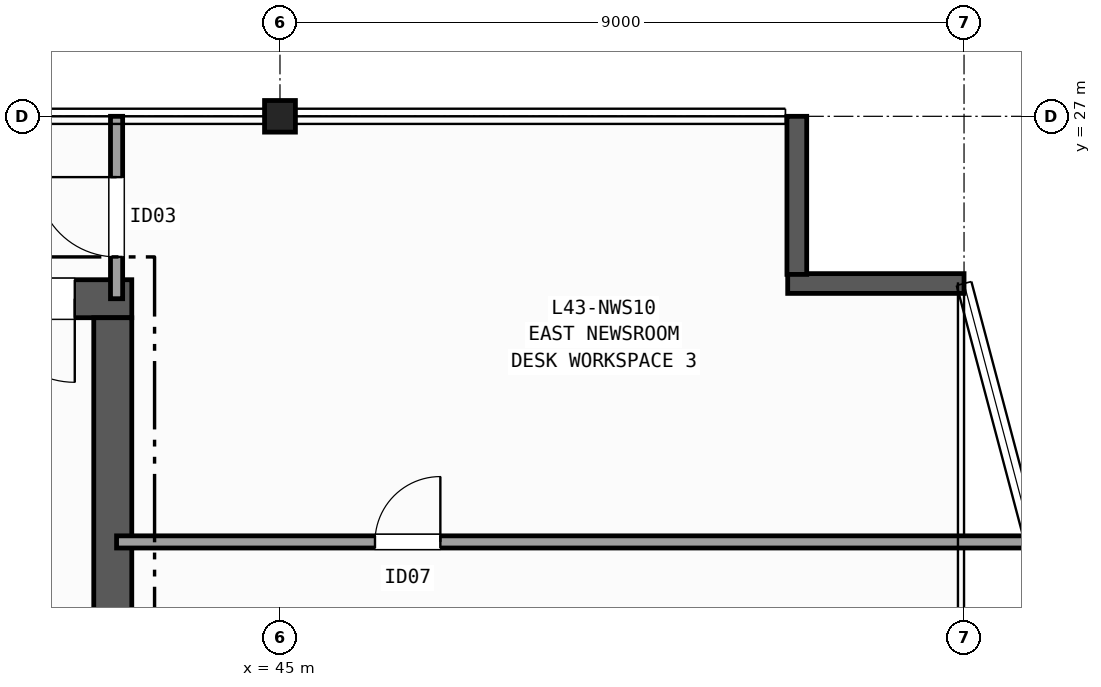
"""IFC4 building model, lengths in metres.
Left out: names, types, materials, properties, quantities, classifications, styles, units other than length and angle.
Written with IfcOpenShell. Run it as: python <this file> out.ifc"""

import sys

from ifc_helpers import new_model, si_unit, direction, frame, frame_2d, origin, origin_2d, place, context, subcontext, project, spatial, rectangle, i_section, extrude, element, fill, save


model = new_model("IFC4")
c1 = context("Model", 3, precision=1e-05, world=origin(), true_north=direction((0.0, 1.0)))
c2 = subcontext(c1, "Body", "Model", "MODEL_VIEW")
j1 = project(units=[si_unit("LENGTHUNIT", "METRE"), si_unit("PLANEANGLEUNIT", "RADIAN")], contexts=[c1])
p1 = place(None, origin())
s1 = spatial("IfcSite", under=j1, at=p1, CompositionType="ELEMENT")
p2 = place(p1, origin())
s2 = spatial("IfcBuilding", under=s1, at=p2, CompositionType="ELEMENT")
p3 = place(p2, frame((0.0, 0.0, 174.2)))
s3 = spatial("IfcBuildingStorey", under=s2, at=p3, CompositionType="ELEMENT", Elevation=174.2)
p4 = place(p3, frame((45.0, 27.0, 0.0), z_axis=(0.0, 0.0, 1.0), x_axis=(1.0, 0.0, 0.0)))
e1 = element("IfcColumn", 1, at=p4, inside=s3, PredefinedType="COLUMN", context=c2, shape_type="SweptSolid", body=[
    extrude(i_section(OverallWidth=0.406, OverallDepth=0.416, WebThickness=0.03, FlangeThickness=0.048, FilletRadius=0.015, at=origin_2d()), origin(), (0.0, 0.0, 1.0), 3.7),
])
p5 = place(p3, frame((54.0, 24.8, 0.0), z_axis=(0.0, 0.0, 1.0), x_axis=(-1.0, 0.0, 0.0)))
e2 = element("IfcWall", 2, at=p5, inside=s3, PredefinedType="SOLIDWALL", context=c2, shape_type="SweptSolid", body=[
    extrude(rectangle(XDim=2.32, YDim=0.26, at=frame_2d((1.16, 0.0))), origin(), (0.0, 0.0, 1.0), 3.42),
])
p6 = place(p3, frame((51.8, 24.92, 0.0), z_axis=(0.0, 0.0, 1.0), x_axis=(0.0, 1.0, 0.0)))
e3 = element("IfcWall", 3, at=p6, inside=s3, PredefinedType="SOLIDWALL", context=c2, shape_type="SweptSolid", body=[
    extrude(rectangle(XDim=2.08, YDim=0.26, at=frame_2d((1.04, 0.0))), origin(), (0.0, 0.0, 1.0), 3.42),
])
p7 = place(p3, frame((43.05, 24.6, 0.0), z_axis=(0.0, 0.0, 1.0), x_axis=(-1.0, 0.0, 0.0)))
e4 = element("IfcWall", 4, at=p7, inside=s3, PredefinedType="SHEAR", context=c2, shape_type="SweptSolid", body=[
    extrude(rectangle(XDim=13.9, YDim=0.5, at=frame_2d((6.95, 0.0))), origin(), (0.0, 0.0, 1.0), 3.42),
])
p8 = place(p7, frame((0.75, 0.0, 0.0)))
e5 = element("IfcOpeningElement", 5, at=p8, cuts=e4, PredefinedType="OPENING", context=c2, shape_type="SweptSolid", body=[
    extrude(rectangle(XDim=1.1, YDim=2.15, at=frame_2d((0.55, 1.075))), frame((0.0, 0.26, 0.0), z_axis=(0.0, -1.0, 0.0), x_axis=(1.0, 0.0, 0.0)), (0.0, 0.0, 1.0), 0.52),
])
p9 = place(p7, frame((2.7, 0.0, 0.0)))
e6 = element("IfcOpeningElement", 6, at=p9, cuts=e4, PredefinedType="OPENING", context=c2, shape_type="SweptSolid", body=[
    extrude(rectangle(XDim=0.9, YDim=2.1, at=frame_2d((0.45, 1.05))), frame((0.0, 0.26, 0.0), z_axis=(0.0, -1.0, 0.0), x_axis=(1.0, 0.0, 0.0)), (0.0, 0.0, 1.0), 0.52),
])
p10 = place(p7, frame((4.6, 0.0, 0.0)))
e7 = element("IfcOpeningElement", 7, at=p10, cuts=e4, PredefinedType="OPENING", context=c2, shape_type="SweptSolid", body=[
    extrude(rectangle(XDim=0.9, YDim=2.1, at=frame_2d((0.45, 1.05))), frame((0.0, 0.26, 0.0), z_axis=(0.0, -1.0, 0.0), x_axis=(1.0, 0.0, 0.0)), (0.0, 0.0, 1.0), 0.52),
])
p11 = place(p3, frame((42.8, 11.45, 0.0), z_axis=(0.0, 0.0, 1.0), x_axis=(0.0, 1.0, 0.0)))
e8 = element("IfcWall", 8, at=p11, inside=s3, PredefinedType="SHEAR", context=c2, shape_type="SweptSolid", body=[
    extrude(rectangle(XDim=12.9, YDim=0.5, at=frame_2d((6.45, 0.0))), origin(), (0.0, 0.0, 1.0), 3.42),
])
p12 = place(p3, frame((42.85, 24.6, 0.0), z_axis=(0.0, 0.0, 1.0), x_axis=(0.0, 1.0, 0.0)))
e9 = element("IfcWall", 9, at=p12, inside=s3, PredefinedType="PARTITIONING", context=c2, shape_type="SweptSolid", body=[
    extrude(rectangle(XDim=2.4, YDim=0.16, at=frame_2d((1.2, 0.0))), origin(), (0.0, 0.0, 1.0), 2.634),
])
p13 = place(p12, frame((0.55, 0.0, 0.0)))
e10 = element("IfcOpeningElement", 10, at=p13, cuts=e9, PredefinedType="OPENING", context=c2, shape_type="SweptSolid", body=[
    extrude(rectangle(XDim=1.05, YDim=2.15, at=frame_2d((0.525, 1.075))), frame((0.0, 0.09, 0.0), z_axis=(0.0, -1.0, 0.0), x_axis=(1.0, 0.0, 0.0)), (0.0, 0.0, 1.0), 0.18),
])
p14 = place(p3, frame((42.85, 21.4, 0.0), z_axis=(0.0, 0.0, 1.0), x_axis=(1.0, 0.0, 0.0)))
e11 = element("IfcWall", 11, at=p14, inside=s3, PredefinedType="PARTITIONING", context=c2, shape_type="SweptSolid", body=[
    extrude(rectangle(XDim=12.05, YDim=0.16, at=frame_2d((6.025, 0.0))), origin(), (0.0, 0.0, 1.0), 3.42),
])
p15 = place(p14, frame((3.4, 0.0, 0.0)))
e12 = element("IfcOpeningElement", 12, at=p15, cuts=e11, PredefinedType="OPENING", context=c2, shape_type="SweptSolid", body=[
    extrude(rectangle(XDim=0.86, YDim=2.05, at=frame_2d((0.43, 1.025))), frame((0.0, 0.09, 0.0), z_axis=(0.0, -1.0, 0.0), x_axis=(1.0, 0.0, 0.0)), (0.0, 0.0, 1.0), 0.18),
])
p16 = place(p8, origin())
e13 = element("IfcDoor", 13, at=p16, inside=s3, OperationType="SINGLE_SWING_LEFT", PredefinedType="DOOR", context=c2, shape_type="SweptSolid", body=[
    extrude(rectangle(XDim=1.1, YDim=2.15, at=frame_2d((0.55, 1.075))), frame((0.0, 0.025, 0.0), z_axis=(0.0, -1.0, 0.0), x_axis=(1.0, 0.0, 0.0)), (0.0, 0.0, 1.0), 0.05),
])
fill(e5, e13)
p17 = place(p13, origin())
e14 = element("IfcDoor", 14, at=p17, inside=s3, OperationType="SINGLE_SWING_RIGHT", PredefinedType="DOOR", context=c2, shape_type="SweptSolid", body=[
    extrude(rectangle(XDim=1.05, YDim=2.15, at=frame_2d((0.525, 1.075))), frame((0.0, 0.025, 0.0), z_axis=(0.0, -1.0, 0.0), x_axis=(1.0, 0.0, 0.0)), (0.0, 0.0, 1.0), 0.05),
])
fill(e10, e14)
p18 = place(p15, origin())
e15 = element("IfcDoor", 15, at=p18, inside=s3, OperationType="SINGLE_SWING_RIGHT", PredefinedType="DOOR", context=c2, shape_type="SweptSolid", body=[
    extrude(rectangle(XDim=0.86, YDim=2.05, at=frame_2d((0.43, 1.025))), frame((0.0, 0.025, 0.0), z_axis=(0.0, -1.0, 0.0), x_axis=(1.0, 0.0, 0.0)), (0.0, 0.0, 1.0), 0.05),
])
fill(e12, e15)
save(model, sys.argv[1])
